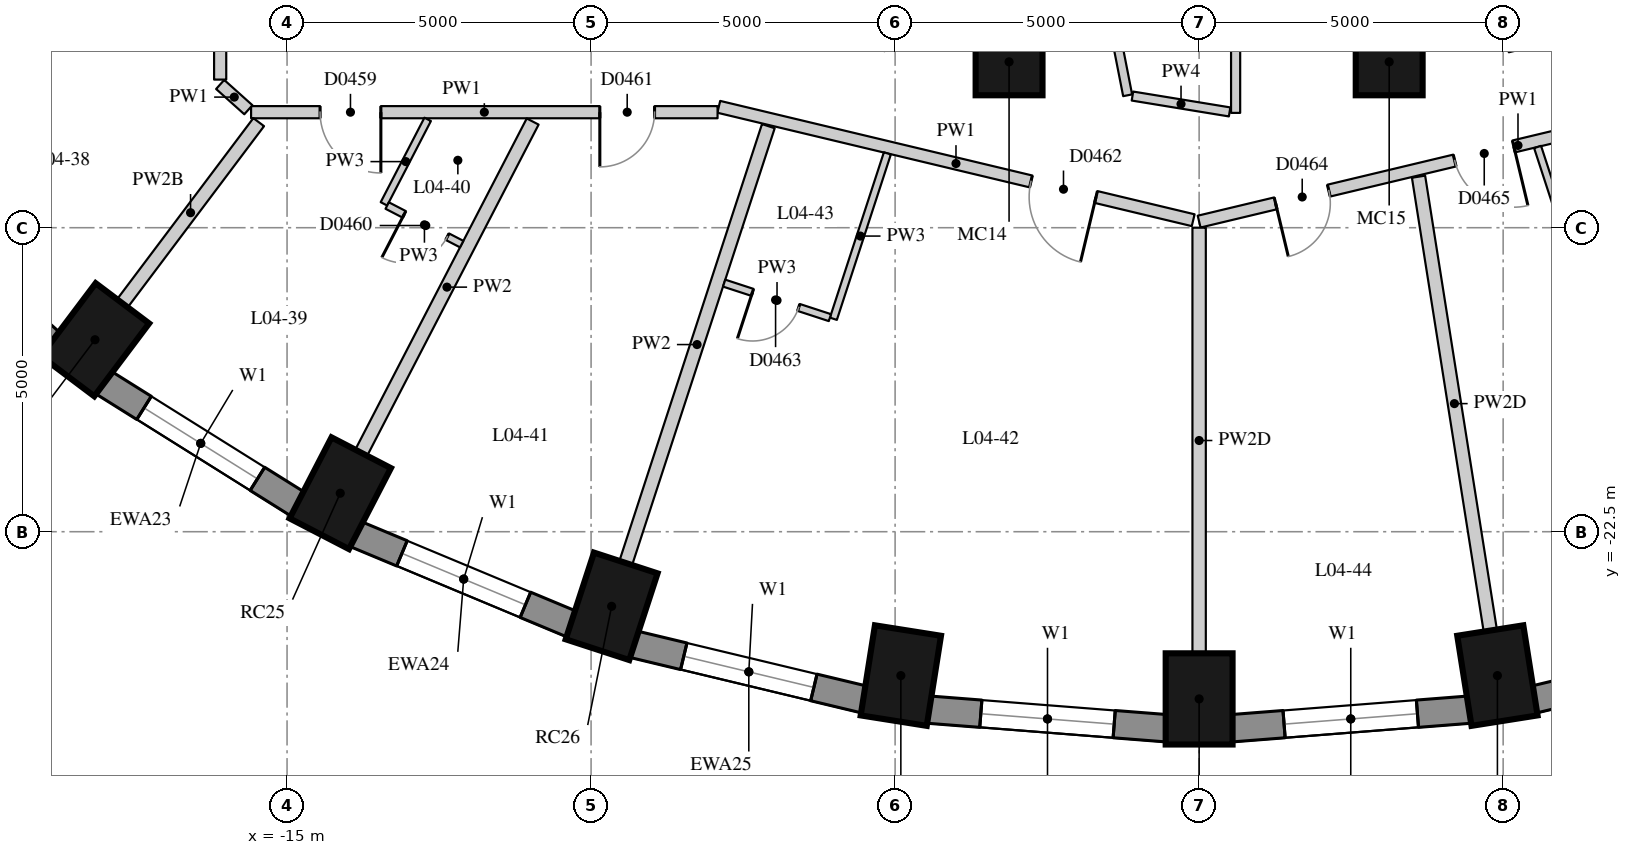
"""IFC4 building model, lengths in metres.
Left out: names, types, materials, properties, quantities, classifications, styles, units other than length and angle.
Written with IfcOpenShell. Run it as: python <this file> out.ifc"""

import sys

from ifc_helpers import new_model, si_unit, direction, frame, frame_2d, origin, origin_2d, place, context, subcontext, project, spatial, rectangle, extrude, element, fill, save


model = new_model("IFC4")
c1 = context("Model", 3, precision=1e-05, world=origin(), true_north=direction((0.0, 1.0)))
c2 = subcontext(c1, "Body", "Model", "MODEL_VIEW")
j1 = project(units=[si_unit("LENGTHUNIT", "METRE"), si_unit("PLANEANGLEUNIT", "RADIAN")], contexts=[c1])
p1 = place(None, origin())
s1 = spatial("IfcSite", under=j1, at=p1, CompositionType="ELEMENT")
p2 = place(p1, origin())
s2 = spatial("IfcBuilding", under=s1, at=p2, CompositionType="ELEMENT")
p3 = place(p2, frame((0.0, 0.0, 21.7)))
s3 = spatial("IfcBuildingStorey", under=s2, at=p3, CompositionType="ELEMENT", Elevation=21.7)
for number, where, z_axis, x_axis in (
    (1, (-18.159, -19.343, 0.0), (0.0, 0.0, 1.0), (-0.601, -0.799, 0.0)),
    (2, (-14.125, -21.867, 0.0), (0.0, 0.0, 1.0), (-0.46, -0.888, 0.0)),
    (3, (-9.662, -23.727, 0.0), (0.0, 0.0, 1.0), (-0.31, -0.951, 0.0)),
    (4, (-4.906, -24.866, 0.0), (0.0, 0.0, 1.0), (-0.156, -0.988, 0.0)),
    (5, (0.0, -25.25, 0.0), (0.0, 0.0, 1.0), (0.0, -1.0, 0.0)),
    (6, (4.906, -24.866, 0.0), (0.0, 0.0, 1.0), (0.156, -0.988, 0.0)),
):
    element("IfcColumn", number, at=place(p3, frame(where, z_axis=z_axis, x_axis=x_axis)), inside=s3, PredefinedType="COLUMN", context=c2, shape_type="SweptSolid", body=[
        extrude(rectangle(XDim=1.5, YDim=1.1, at=origin_2d()), origin(), (0.0, 0.0, 1.0), 3.3),
    ])
for number, where, z_axis, x_axis in (
    (7, (-3.126, -14.772, 0.0), (0.0, 0.0, 1.0), (1.0, 0.0, 0.0)),
    (8, (3.126, -14.772, 0.0), (0.0, 0.0, 1.0), (1.0, 0.0, 0.0)),
):
    element("IfcColumn", number, at=place(p3, frame(where, z_axis=z_axis, x_axis=x_axis)), inside=s3, PredefinedType="COLUMN", context=c2, shape_type="SweptSolid", body=[
        extrude(rectangle(XDim=1.1, YDim=1.1, at=origin_2d()), origin(), (0.0, 0.0, 1.0), 3.3),
    ])
p4 = place(p3, frame((-21.627, -16.943, 0.0), z_axis=(0.0, 0.0, 1.0), x_axis=(0.745526233716, -0.66647628228, 0.0)))
e9 = element("IfcWall", 9, at=p4, inside=s3, PredefinedType="SOLIDWALL", context=c2, shape_type="SweptSolid", body=[
    extrude(rectangle(XDim=3.697, YDim=0.45, at=frame_2d((1.848, 0.0))), origin(), (0.0, 0.0, 1.0), 3.02),
])
p5 = place(p4, frame((0.749, 0.0, 0.4)))
e10 = element("IfcOpeningElement", 10, at=p5, cuts=e9, PredefinedType="OPENING", context=c2, shape_type="SweptSolid", body=[
    extrude(rectangle(XDim=2.2, YDim=1.75, at=frame_2d((1.1, 0.875))), frame((0.0, 0.235, 0.0), z_axis=(0.0, -1.0, 0.0), x_axis=(1.0, 0.0, 0.0)), (0.0, 0.0, 1.0), 0.47),
])
p6 = place(p3, frame((-18.023, -20.044, 0.0), z_axis=(0.0, 0.0, 1.0), x_axis=(0.847635480093, -0.530579016629, 0.0)))
e11 = element("IfcWall", 11, at=p6, inside=s3, PredefinedType="SOLIDWALL", context=c2, shape_type="SweptSolid", body=[
    extrude(rectangle(XDim=3.782, YDim=0.45, at=frame_2d((1.891, 0.0))), origin(), (0.0, 0.0, 1.0), 3.02),
])
p7 = place(p6, frame((0.791, 0.0, 0.4)))
e12 = element("IfcOpeningElement", 12, at=p7, cuts=e11, PredefinedType="OPENING", context=c2, shape_type="SweptSolid", body=[
    extrude(rectangle(XDim=2.2, YDim=1.75, at=frame_2d((1.1, 0.875))), frame((0.0, 0.235, 0.0), z_axis=(0.0, -1.0, 0.0), x_axis=(1.0, 0.0, 0.0)), (0.0, 0.0, 1.0), 0.47),
])
p8 = place(p3, frame((-13.875, -22.537, 0.0), z_axis=(0.0, 0.0, 1.0), x_axis=(0.923031964282, -0.384723267966, 0.0)))
e13 = element("IfcWall", 13, at=p8, inside=s3, PredefinedType="SOLIDWALL", context=c2, shape_type="SweptSolid", body=[
    extrude(rectangle(XDim=3.856, YDim=0.45, at=frame_2d((1.928, 0.0))), origin(), (0.0, 0.0, 1.0), 3.02),
])
p9 = place(p8, frame((0.828, 0.0, 0.4)))
e14 = element("IfcOpeningElement", 14, at=p9, cuts=e13, PredefinedType="OPENING", context=c2, shape_type="SweptSolid", body=[
    extrude(rectangle(XDim=2.2, YDim=1.75, at=frame_2d((1.1, 0.875))), frame((0.0, 0.235, 0.0), z_axis=(0.0, -1.0, 0.0), x_axis=(1.0, 0.0, 0.0)), (0.0, 0.0, 1.0), 0.47),
])
p10 = place(p3, frame((-9.308, -24.35, 0.0), z_axis=(0.0, 0.0, 1.0), x_axis=(0.972496561493, -0.232917233979, 0.0)))
e15 = element("IfcWall", 15, at=p10, inside=s3, PredefinedType="SOLIDWALL", context=c2, shape_type="SweptSolid", body=[
    extrude(rectangle(XDim=3.911, YDim=0.45, at=frame_2d((1.956, 0.0))), origin(), (0.0, 0.0, 1.0), 3.02),
])
p11 = place(p10, frame((0.855, 0.0, 0.4)))
e16 = element("IfcOpeningElement", 16, at=p11, cuts=e15, PredefinedType="OPENING", context=c2, shape_type="SweptSolid", body=[
    extrude(rectangle(XDim=2.2, YDim=1.75, at=frame_2d((1.1, 0.875))), frame((0.0, 0.235, 0.0), z_axis=(0.0, -1.0, 0.0), x_axis=(1.0, 0.0, 0.0)), (0.0, 0.0, 1.0), 0.47),
])
p12 = place(p3, frame((-4.457, -25.426, 0.0), z_axis=(0.0, 0.0, 1.0), x_axis=(0.996955972145, -0.077966592873, 0.0)))
e17 = element("IfcWall", 17, at=p12, inside=s3, PredefinedType="SOLIDWALL", context=c2, shape_type="SweptSolid", body=[
    extrude(rectangle(XDim=3.939, YDim=0.45, at=frame_2d((1.97, 0.0))), origin(), (0.0, 0.0, 1.0), 3.02),
])
p13 = place(p12, frame((0.87, 0.0, 0.4)))
e18 = element("IfcOpeningElement", 18, at=p13, cuts=e17, PredefinedType="OPENING", context=c2, shape_type="SweptSolid", body=[
    extrude(rectangle(XDim=2.2, YDim=1.75, at=frame_2d((1.1, 0.875))), frame((0.0, 0.235, 0.0), z_axis=(0.0, -1.0, 0.0), x_axis=(1.0, 0.0, 0.0)), (0.0, 0.0, 1.0), 0.47),
])
p14 = place(p3, frame((0.53, -25.733, 0.0), z_axis=(0.0, 0.0, 1.0), x_axis=(0.996955972145, 0.077966592873, 0.0)))
e19 = element("IfcWall", 19, at=p14, inside=s3, PredefinedType="SOLIDWALL", context=c2, shape_type="SweptSolid", body=[
    extrude(rectangle(XDim=3.939, YDim=0.45, at=frame_2d((1.97, 0.0))), origin(), (0.0, 0.0, 1.0), 3.02),
])
p15 = place(p14, frame((0.87, 0.0, 0.4)))
e20 = element("IfcOpeningElement", 20, at=p15, cuts=e19, PredefinedType="OPENING", context=c2, shape_type="SweptSolid", body=[
    extrude(rectangle(XDim=2.2, YDim=1.75, at=frame_2d((1.1, 0.875))), frame((0.0, 0.235, 0.0), z_axis=(0.0, -1.0, 0.0), x_axis=(1.0, 0.0, 0.0)), (0.0, 0.0, 1.0), 0.47),
])
p16 = place(p3, frame((5.504, -25.26, 0.0), z_axis=(0.0, 0.0, 1.0), x_axis=(0.972496561493, 0.232917233979, 0.0)))
e21 = element("IfcWall", 21, at=p16, inside=s3, PredefinedType="SOLIDWALL", context=c2, shape_type="SweptSolid", body=[
    extrude(rectangle(XDim=3.911, YDim=0.45, at=frame_2d((1.956, 0.0))), origin(), (0.0, 0.0, 1.0), 3.02),
])
p17 = place(p16, frame((0.855, 0.0, 0.4)))
e22 = element("IfcOpeningElement", 22, at=p17, cuts=e21, PredefinedType="OPENING", context=c2, shape_type="SweptSolid", body=[
    extrude(rectangle(XDim=2.2, YDim=1.75, at=frame_2d((1.1, 0.875))), frame((0.0, 0.235, 0.0), z_axis=(0.0, -1.0, 0.0), x_axis=(1.0, 0.0, 0.0)), (0.0, 0.0, 1.0), 0.47),
])
p18 = place(p3, frame((10.488, -14.893, 0.0), z_axis=(0.0, 0.0, 1.0), x_axis=(-0.972603489924, -0.23247032367, 0.0)))
e23 = element("IfcWall", 23, at=p18, inside=s3, PredefinedType="PARTITIONING", context=c2, shape_type="SweptSolid", body=[
    extrude(rectangle(XDim=10.783, YDim=0.2, at=frame_2d((5.392, 0.0))), origin(), (0.0, 0.0, 1.0), 3.02),
])
p19 = place(p18, frame((8.59, 0.0, 0.0)))
e24 = element("IfcOpeningElement", 24, at=p19, cuts=e23, PredefinedType="OPENING", context=c2, shape_type="SweptSolid", body=[
    extrude(rectangle(XDim=0.9, YDim=2.1, at=frame_2d((0.45, 1.05))), frame((0.0, 0.11, 0.0), z_axis=(0.0, -1.0, 0.0), x_axis=(1.0, 0.0, 0.0)), (0.0, 0.0, 1.0), 0.22),
])
p20 = place(p18, frame((5.462, 0.0, 0.0)))
e25 = element("IfcOpeningElement", 25, at=p20, cuts=e23, PredefinedType="OPENING", context=c2, shape_type="SweptSolid", body=[
    extrude(rectangle(XDim=1.0, YDim=2.1, at=frame_2d((0.5, 1.05))), frame((0.0, 0.11, 0.0), z_axis=(0.0, -1.0, 0.0), x_axis=(1.0, 0.0, 0.0)), (0.0, 0.0, 1.0), 0.22),
])
p21 = place(p3, frame((-0.098, -17.377, 0.0), z_axis=(0.0, 0.0, 1.0), x_axis=(-0.97260043732, 0.232483094708, 0.0)))
e26 = element("IfcWall", 26, at=p21, inside=s3, PredefinedType="PARTITIONING", context=c2, shape_type="SweptSolid", body=[
    extrude(rectangle(XDim=8.022, YDim=0.2, at=frame_2d((4.011, 0.0))), origin(), (0.0, 0.0, 1.0), 3.02),
])
p22 = place(p21, frame((1.643, 0.0, 0.0)))
e27 = element("IfcOpeningElement", 27, at=p22, cuts=e26, PredefinedType="OPENING", context=c2, shape_type="SweptSolid", body=[
    extrude(rectangle(XDim=1.1, YDim=2.1, at=frame_2d((0.55, 1.05))), frame((0.0, 0.11, 0.0), z_axis=(0.0, -1.0, 0.0), x_axis=(1.0, 0.0, 0.0)), (0.0, 0.0, 1.0), 0.22),
])
p23 = place(p3, frame((-7.92, -15.6, 0.0), z_axis=(0.0, 0.0, 1.0), x_axis=(-1.0, 0.0, 0.0)))
e28 = element("IfcWall", 28, at=p23, inside=s3, PredefinedType="PARTITIONING", context=c2, shape_type="SweptSolid", body=[
    extrude(rectangle(XDim=7.672, YDim=0.2, at=frame_2d((3.836, 0.0))), origin(), (0.0, 0.0, 1.0), 3.02),
])
p24 = place(p23, frame((5.537, 0.0, 0.0)))
e29 = element("IfcOpeningElement", 29, at=p24, cuts=e28, PredefinedType="OPENING", context=c2, shape_type="SweptSolid", body=[
    extrude(rectangle(XDim=1.0, YDim=2.1, at=frame_2d((0.5, 1.05))), frame((0.0, 0.11, 0.0), z_axis=(0.0, -1.0, 0.0), x_axis=(1.0, 0.0, 0.0)), (0.0, 0.0, 1.0), 0.22),
])
p25 = place(p23, frame((1.036, 0.0, 0.0)))
e30 = element("IfcOpeningElement", 30, at=p25, cuts=e28, PredefinedType="OPENING", context=c2, shape_type="SweptSolid", body=[
    extrude(rectangle(XDim=0.9, YDim=2.1, at=frame_2d((0.45, 1.05))), frame((0.0, 0.11, 0.0), z_axis=(0.0, -1.0, 0.0), x_axis=(1.0, 0.0, 0.0)), (0.0, 0.0, 1.0), 0.22),
])
p26 = place(p3, frame((-15.636, -15.56, 0.0), z_axis=(0.0, 0.0, 1.0), x_axis=(-0.744656758283, 0.667447610187, 0.0)))
e31 = element("IfcWall", 31, at=p26, inside=s3, PredefinedType="PARTITIONING", context=c2, shape_type="SweptSolid", body=[
    extrude(rectangle(XDim=0.623, YDim=0.2, at=frame_2d((0.312, 0.0))), origin(), (0.0, 0.0, 1.0), 3.02),
])
p27 = place(p3, frame((-16.1, -15.064, 0.0), z_axis=(0.0, 0.0, 1.0), x_axis=(0.0, 1.0, 0.0)))
e32 = element("IfcWall", 32, at=p27, inside=s3, PredefinedType="PARTITIONING", context=c2, shape_type="SweptSolid", body=[
    extrude(rectangle(XDim=6.047, YDim=0.2, at=frame_2d((3.023, 0.0))), origin(), (0.0, 0.0, 1.0), 3.02),
])
p28 = place(p27, frame((4.727, 0.0, 0.0)))
e33 = element("IfcOpeningElement", 33, at=p28, cuts=e32, PredefinedType="OPENING", context=c2, shape_type="SweptSolid", body=[
    extrude(rectangle(XDim=1.1, YDim=2.1, at=frame_2d((0.55, 1.05))), frame((0.0, 0.11, 0.0), z_axis=(0.0, -1.0, 0.0), x_axis=(1.0, 0.0, 0.0)), (0.0, 0.0, 1.0), 0.22),
])
p29 = place(p27, frame((1.467, 0.0, 0.0)))
e34 = element("IfcOpeningElement", 34, at=p29, cuts=e32, PredefinedType="OPENING", context=c2, shape_type="SweptSolid", body=[
    extrude(rectangle(XDim=1.1, YDim=2.1, at=frame_2d((0.55, 1.05))), frame((0.0, 0.11, 0.0), z_axis=(0.0, -1.0, 0.0), x_axis=(1.0, 0.0, 0.0)), (0.0, 0.0, 1.0), 0.22),
])
p30 = place(p3, frame((-1.176, -15.322, 0.0), z_axis=(0.0, 0.0, 1.0), x_axis=(-0.192477233237, 0.981301439256, 0.0)))
e35 = element("IfcWall", 35, at=p30, inside=s3, PredefinedType="PARTITIONING", context=c2, shape_type="SweptSolid", body=[
    extrude(rectangle(XDim=2.13, YDim=0.15, at=frame_2d((1.065, 0.0))), origin(), (0.0, 0.0, 1.0), 3.02),
])
p31 = place(p3, frame((0.6, -9.23, 0.0), z_axis=(0.0, 0.0, 1.0), x_axis=(0.0, -1.0, 0.0)))
e36 = element("IfcWall", 36, at=p31, inside=s3, PredefinedType="PARTITIONING", context=c2, shape_type="SweptSolid", body=[
    extrude(rectangle(XDim=6.382, YDim=0.15, at=frame_2d((3.191, 0.0))), origin(), (0.0, 0.0, 1.0), 2.47),
])
p32 = place(p3, frame((0.501, -15.596, 0.0), z_axis=(0.0, 0.0, 1.0), x_axis=(-0.986922601781, 0.161194845119, 0.0)))
e37 = element("IfcWall", 37, at=p32, inside=s3, PredefinedType="PARTITIONING", context=c2, shape_type="SweptSolid", body=[
    extrude(rectangle(XDim=1.619, YDim=0.15, at=frame_2d((0.81, 0.0))), origin(), (0.0, 0.0, 1.0), 3.02),
])
p33 = place(p3, frame((9.673, -13.443, 0.0), z_axis=(0.0, 0.0, 1.0), x_axis=(-0.972603013932, -0.232472315103, 0.0)))
e38 = element("IfcWall", 38, at=p33, inside=s3, PredefinedType="PARTITIONING", context=c2, shape_type="SweptSolid", body=[
    extrude(rectangle(XDim=4.727, YDim=0.15, at=frame_2d((2.363, 0.0))), origin(), (0.0, 0.0, 1.0), 3.02),
])
p34 = place(p33, frame((1.914, 0.0, 0.0)))
e39 = element("IfcOpeningElement", 39, at=p34, cuts=e38, PredefinedType="OPENING", context=c2, shape_type="SweptSolid", body=[
    extrude(rectangle(XDim=0.9, YDim=2.1, at=frame_2d((0.45, 1.05))), frame((0.0, 0.085, 0.0), z_axis=(0.0, -1.0, 0.0), x_axis=(1.0, 0.0, 0.0)), (0.0, 0.0, 1.0), 0.17),
])
p35 = place(p3, frame((-21.093, -15.718, 0.0), z_axis=(0.0, 0.0, 1.0), x_axis=(0.73009284205, 0.683347965525, 0.0)))
e40 = element("IfcWall", 40, at=p35, inside=s3, PredefinedType="PARTITIONING", context=c2, shape_type="SweptSolid", body=[
    extrude(rectangle(XDim=6.602, YDim=0.22, at=frame_2d((3.301, 0.0))), origin(), (0.0, 0.0, 1.0), 3.02),
])
p36 = place(p3, frame((-17.708, -18.743, 0.0), z_axis=(0.0, 0.0, 1.0), x_axis=(0.601172757903, 0.799119086967, 0.0)))
e41 = element("IfcWall", 41, at=p36, inside=s3, PredefinedType="PARTITIONING", context=c2, shape_type="SweptSolid", body=[
    extrude(rectangle(XDim=3.729, YDim=0.22, at=frame_2d((1.864, 0.0))), origin(), (0.0, 0.0, 1.0), 2.57),
])
p37 = place(p3, frame((-13.78, -21.201, 0.0), z_axis=(0.0, 0.0, 1.0), x_axis=(0.459699000582, 0.888074787878, 0.0)))
e42 = element("IfcWall", 42, at=p37, inside=s3, PredefinedType="PARTITIONING", context=c2, shape_type="SweptSolid", body=[
    extrude(rectangle(XDim=6.134, YDim=0.22, at=frame_2d((3.067, 0.0))), origin(), (0.0, 0.0, 1.0), 3.02),
])
p38 = place(p3, frame((-9.429, -23.014, 0.0), z_axis=(0.0, 0.0, 1.0), x_axis=(0.310261176215, 0.950651356983, 0.0)))
e43 = element("IfcWall", 43, at=p38, inside=s3, PredefinedType="PARTITIONING", context=c2, shape_type="SweptSolid", body=[
    extrude(rectangle(XDim=7.557, YDim=0.22, at=frame_2d((3.779, 0.0))), origin(), (0.0, 0.0, 1.0), 3.02),
])
p39 = place(p3, frame((0.0, -24.5, 0.0), z_axis=(0.0, 0.0, 1.0), x_axis=(0.0, 1.0, 0.0)))
e44 = element("IfcWall", 44, at=p39, inside=s3, PredefinedType="PARTITIONING", context=c2, shape_type="SweptSolid", body=[
    extrude(rectangle(XDim=7.0, YDim=0.22, at=frame_2d((3.5, 0.0))), origin(), (0.0, 0.0, 1.0), 2.47),
])
p40 = place(p3, frame((4.788, -24.125, 0.0), z_axis=(0.0, 0.0, 1.0), x_axis=(-0.156131781396, 0.987736233434, 0.0)))
e45 = element("IfcWall", 45, at=p40, inside=s3, PredefinedType="PARTITIONING", context=c2, shape_type="SweptSolid", body=[
    extrude(rectangle(XDim=7.557, YDim=0.22, at=frame_2d((3.779, 0.0))), origin(), (0.0, 0.0, 1.0), 2.47),
])
p41 = place(p3, frame((-12.687, -15.718, 0.0), z_axis=(0.0, 0.0, 1.0), x_axis=(-0.459775159711, -0.888035361071, 0.0)))
e46 = element("IfcWall", 46, at=p41, inside=s3, PredefinedType="PARTITIONING", context=c2, shape_type="SweptSolid", body=[
    extrude(rectangle(XDim=1.565, YDim=0.12, at=frame_2d((0.782, 0.0))), origin(), (0.0, 0.0, 1.0), 3.02),
])
p42 = place(p3, frame((-5.127, -16.277, 0.0), z_axis=(0.0, 0.0, 1.0), x_axis=(-0.310206676877, -0.950669142037, 0.0)))
e47 = element("IfcWall", 47, at=p42, inside=s3, PredefinedType="PARTITIONING", context=c2, shape_type="SweptSolid", body=[
    extrude(rectangle(XDim=2.862, YDim=0.12, at=frame_2d((1.431, 0.0))), origin(), (0.0, 0.0, 1.0), 3.02),
])
p43 = place(p3, frame((5.566, -16.172, 0.0), z_axis=(0.0, 0.0, 1.0), x_axis=(0.310159281599, -0.950684605975, 0.0)))
e48 = element("IfcWall", 48, at=p43, inside=s3, PredefinedType="PARTITIONING", context=c2, shape_type="SweptSolid", body=[
    extrude(rectangle(XDim=2.525, YDim=0.12, at=frame_2d((1.263, 0.0))), origin(), (0.0, 0.0, 1.0), 3.02),
])
p44 = place(p3, frame((-13.353, -17.135, 0.0), z_axis=(0.0, 0.0, 1.0), x_axis=(0.888075681402, -0.459697274413, 0.0)))
e49 = element("IfcWall", 49, at=p44, inside=s3, PredefinedType="PARTITIONING", context=c2, shape_type="SweptSolid", body=[
    extrude(rectangle(XDim=1.38, YDim=0.12, at=frame_2d((0.69, 0.0))), origin(), (0.0, 0.0, 1.0), 3.02),
])
p45 = place(p44, frame((0.315, 0.0, 0.0)))
e50 = element("IfcOpeningElement", 50, at=p45, cuts=e49, PredefinedType="OPENING", context=c2, shape_type="SweptSolid", body=[
    extrude(rectangle(XDim=0.8, YDim=2.1, at=frame_2d((0.4, 1.05))), frame((0.0, 0.07, 0.0), z_axis=(0.0, -1.0, 0.0), x_axis=(1.0, 0.0, 0.0)), (0.0, 0.0, 1.0), 0.14),
])
p46 = place(p3, frame((-6.072, -18.979, 0.0), z_axis=(0.0, 0.0, 1.0), x_axis=(-0.950678536911, 0.31017788357, 0.0)))
e51 = element("IfcWall", 51, at=p46, inside=s3, PredefinedType="PARTITIONING", context=c2, shape_type="SweptSolid", body=[
    extrude(rectangle(XDim=1.83, YDim=0.12, at=frame_2d((0.915, 0.0))), origin(), (0.0, 0.0, 1.0), 3.02),
])
p47 = place(p46, frame((0.54, 0.0, 0.0)))
e52 = element("IfcOpeningElement", 52, at=p47, cuts=e51, PredefinedType="OPENING", context=c2, shape_type="SweptSolid", body=[
    extrude(rectangle(XDim=0.8, YDim=2.1, at=frame_2d((0.4, 1.05))), frame((0.0, 0.07, 0.0), z_axis=(0.0, -1.0, 0.0), x_axis=(1.0, 0.0, 0.0)), (0.0, 0.0, 1.0), 0.14),
])
p48 = place(p7, origin())
e53 = element("IfcWindow", 53, at=p48, inside=s3, PartitioningType="SINGLE_PANEL", PredefinedType="WINDOW", context=c2, shape_type="SweptSolid", body=[
    extrude(rectangle(XDim=2.2, YDim=1.75, at=frame_2d((1.1, 0.875))), frame((0.0, 0.035, 0.0), z_axis=(0.0, -1.0, 0.0), x_axis=(1.0, 0.0, 0.0)), (0.0, 0.0, 1.0), 0.06),
])
fill(e12, e53)
p49 = place(p9, origin())
e54 = element("IfcWindow", 54, at=p49, inside=s3, PartitioningType="SINGLE_PANEL", PredefinedType="WINDOW", context=c2, shape_type="SweptSolid", body=[
    extrude(rectangle(XDim=2.2, YDim=1.75, at=frame_2d((1.1, 0.875))), frame((0.0, 0.035, 0.0), z_axis=(0.0, -1.0, 0.0), x_axis=(1.0, 0.0, 0.0)), (0.0, 0.0, 1.0), 0.06),
])
fill(e14, e54)
p50 = place(p11, origin())
e55 = element("IfcWindow", 55, at=p50, inside=s3, PartitioningType="SINGLE_PANEL", PredefinedType="WINDOW", context=c2, shape_type="SweptSolid", body=[
    extrude(rectangle(XDim=2.2, YDim=1.75, at=frame_2d((1.1, 0.875))), frame((0.0, 0.035, 0.0), z_axis=(0.0, -1.0, 0.0), x_axis=(1.0, 0.0, 0.0)), (0.0, 0.0, 1.0), 0.06),
])
fill(e16, e55)
p51 = place(p13, origin())
e56 = element("IfcWindow", 56, at=p51, inside=s3, PartitioningType="SINGLE_PANEL", PredefinedType="WINDOW", context=c2, shape_type="SweptSolid", body=[
    extrude(rectangle(XDim=2.2, YDim=1.75, at=frame_2d((1.1, 0.875))), frame((0.0, 0.035, 0.0), z_axis=(0.0, -1.0, 0.0), x_axis=(1.0, 0.0, 0.0)), (0.0, 0.0, 1.0), 0.06),
])
fill(e18, e56)
p52 = place(p15, origin())
e57 = element("IfcWindow", 57, at=p52, inside=s3, PartitioningType="SINGLE_PANEL", PredefinedType="WINDOW", context=c2, shape_type="SweptSolid", body=[
    extrude(rectangle(XDim=2.2, YDim=1.75, at=frame_2d((1.1, 0.875))), frame((0.0, 0.035, 0.0), z_axis=(0.0, -1.0, 0.0), x_axis=(1.0, 0.0, 0.0)), (0.0, 0.0, 1.0), 0.06),
])
fill(e20, e57)
p53 = place(p24, origin())
e58 = element("IfcDoor", 58, at=p53, inside=s3, OperationType="SINGLE_SWING_LEFT", PredefinedType="DOOR", context=c2, shape_type="SweptSolid", body=[
    extrude(rectangle(XDim=1.0, YDim=2.1, at=frame_2d((0.5, 1.05))), frame((0.0, 0.025, 0.0), z_axis=(0.0, -1.0, 0.0), x_axis=(1.0, 0.0, 0.0)), (0.0, 0.0, 1.0), 0.05),
])
fill(e29, e58)
p54 = place(p45, origin())
e59 = element("IfcDoor", 59, at=p54, inside=s3, OperationType="SINGLE_SWING_RIGHT", PredefinedType="DOOR", context=c2, shape_type="SweptSolid", body=[
    extrude(rectangle(XDim=0.8, YDim=2.1, at=frame_2d((0.4, 1.05))), frame((0.0, 0.025, 0.0), z_axis=(0.0, -1.0, 0.0), x_axis=(1.0, 0.0, 0.0)), (0.0, 0.0, 1.0), 0.05),
])
fill(e50, e59)
p55 = place(p25, origin())
e60 = element("IfcDoor", 60, at=p55, inside=s3, OperationType="SINGLE_SWING_RIGHT", PredefinedType="DOOR", context=c2, shape_type="SweptSolid", body=[
    extrude(rectangle(XDim=0.9, YDim=2.1, at=frame_2d((0.45, 1.05))), frame((0.0, 0.025, 0.0), z_axis=(0.0, -1.0, 0.0), x_axis=(1.0, 0.0, 0.0)), (0.0, 0.0, 1.0), 0.05),
])
fill(e30, e60)
p56 = place(p22, origin())
e61 = element("IfcDoor", 61, at=p56, inside=s3, OperationType="SINGLE_SWING_LEFT", PredefinedType="DOOR", context=c2, shape_type="SweptSolid", body=[
    extrude(rectangle(XDim=1.1, YDim=2.1, at=frame_2d((0.55, 1.05))), frame((0.0, 0.025, 0.0), z_axis=(0.0, -1.0, 0.0), x_axis=(1.0, 0.0, 0.0)), (0.0, 0.0, 1.0), 0.05),
])
fill(e27, e61)
p57 = place(p47, origin())
e62 = element("IfcDoor", 62, at=p57, inside=s3, OperationType="SINGLE_SWING_RIGHT", PredefinedType="DOOR", context=c2, shape_type="SweptSolid", body=[
    extrude(rectangle(XDim=0.8, YDim=2.1, at=frame_2d((0.4, 1.05))), frame((0.0, 0.025, 0.0), z_axis=(0.0, -1.0, 0.0), x_axis=(1.0, 0.0, 0.0)), (0.0, 0.0, 1.0), 0.05),
])
fill(e52, e62)
p58 = place(p19, origin())
e63 = element("IfcDoor", 63, at=p58, inside=s3, OperationType="SINGLE_SWING_RIGHT", PredefinedType="DOOR", context=c2, shape_type="SweptSolid", body=[
    extrude(rectangle(XDim=0.9, YDim=2.1, at=frame_2d((0.45, 1.05))), frame((0.0, 0.025, 0.0), z_axis=(0.0, -1.0, 0.0), x_axis=(1.0, 0.0, 0.0)), (0.0, 0.0, 1.0), 0.05),
])
fill(e24, e63)
p59 = place(p20, origin())
e64 = element("IfcDoor", 64, at=p59, inside=s3, OperationType="SINGLE_SWING_LEFT", PredefinedType="DOOR", context=c2, shape_type="SweptSolid", body=[
    extrude(rectangle(XDim=1.0, YDim=2.1, at=frame_2d((0.5, 1.05))), frame((0.0, 0.025, 0.0), z_axis=(0.0, -1.0, 0.0), x_axis=(1.0, 0.0, 0.0)), (0.0, 0.0, 1.0), 0.05),
])
fill(e25, e64)
save(model, sys.argv[1])
